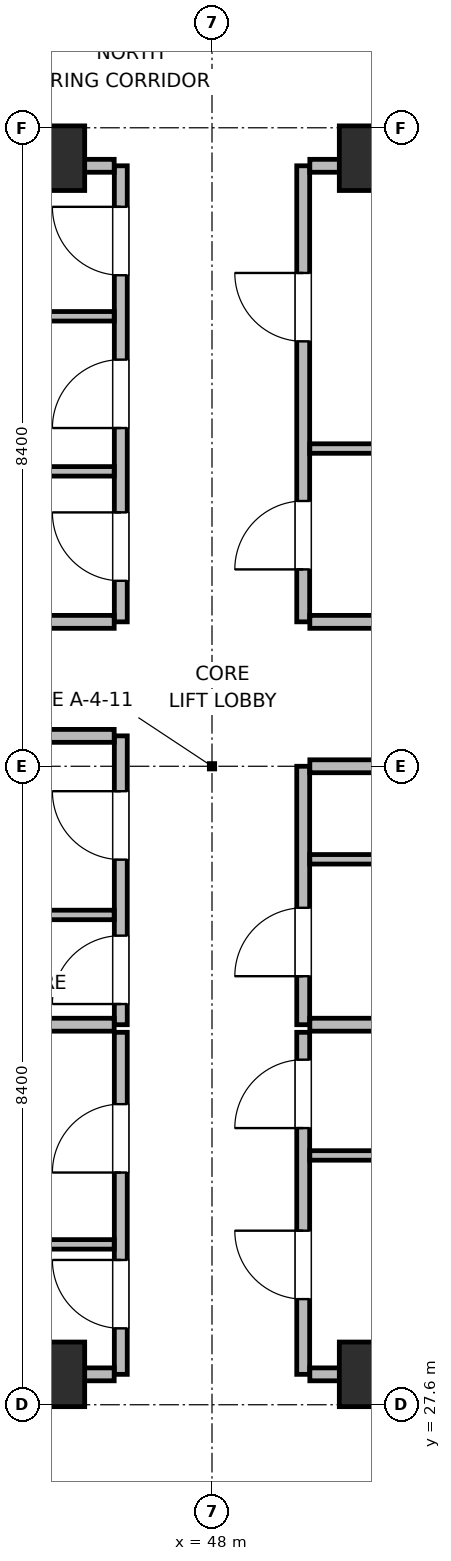
"""IFC4 building model, lengths in metres.
Left out: names, types, materials, properties, quantities, classifications, styles, units other than length and angle.
Written with IfcOpenShell. Run it as: python <this file> out.ifc"""

import sys

from ifc_helpers import new_model, si_unit, direction, frame, frame_2d, origin, origin_2d, place, context, subcontext, project, spatial, rectangle, extrude, element, fill, save


model = new_model("IFC4")
c1 = context("Model", 3, precision=1e-05, world=origin(), true_north=direction((0.0, 1.0)))
c2 = subcontext(c1, "Body", "Model", "MODEL_VIEW")
j1 = project(units=[si_unit("LENGTHUNIT", "METRE"), si_unit("PLANEANGLEUNIT", "RADIAN")], contexts=[c1])
p1 = place(None, origin())
s1 = spatial("IfcSite", under=j1, at=p1, CompositionType="ELEMENT")
p2 = place(p1, origin())
s2 = spatial("IfcBuilding", under=s1, at=p2, CompositionType="ELEMENT")
p3 = place(p2, frame((0.0, 0.0, 325.8)))
s3 = spatial("IfcBuildingStorey", under=s2, at=p3, CompositionType="ELEMENT", Elevation=325.8)
for number, where, z_axis, x_axis in (
    (1, (45.9, 28.0, 0.0), (0.0, 0.0, 1.0), (1.0, 0.0, 0.0)),
    (2, (50.1, 28.0, 0.0), (0.0, 0.0, 1.0), (1.0, 0.0, 0.0)),
    (3, (45.9, 44.0, 0.0), (0.0, 0.0, 1.0), (1.0, 0.0, 0.0)),
    (4, (50.1, 44.0, 0.0), (0.0, 0.0, 1.0), (1.0, 0.0, 0.0)),
):
    element("IfcColumn", number, at=place(p3, frame(where, z_axis=z_axis, x_axis=x_axis)), inside=s3, PredefinedType="COLUMN", context=c2, shape_type="SweptSolid", body=[
        extrude(rectangle(XDim=0.85, YDim=0.85, at=origin_2d()), origin(), (0.0, 0.0, 1.0), 3.9),
    ])
p4 = place(p3, frame((46.8, 32.6, 0.0), z_axis=(0.0, 0.0, 1.0), x_axis=(0.0, 1.0, 0.0)))
e5 = element("IfcWall", 5, at=p4, inside=s3, PredefinedType="PARTITIONING", context=c2, shape_type="SweptSolid", body=[
    extrude(rectangle(XDim=3.8, YDim=0.17, at=frame_2d((1.9, 0.0))), origin(), (0.0, 0.0, 1.0), 3.68),
])
p5 = place(p4, frame((0.272, 0.0, 0.0)))
e6 = element("IfcOpeningElement", 6, at=p5, cuts=e5, PredefinedType="OPENING", context=c2, shape_type="SweptSolid", body=[
    extrude(rectangle(XDim=0.9, YDim=2.02, at=frame_2d((0.45, 1.01))), frame((0.0, 0.095, 0.0), z_axis=(0.0, -1.0, 0.0), x_axis=(1.0, 0.0, 0.0)), (0.0, 0.0, 1.0), 0.19),
])
p6 = place(p4, frame((2.172, 0.0, 0.0)))
e7 = element("IfcOpeningElement", 7, at=p6, cuts=e5, PredefinedType="OPENING", context=c2, shape_type="SweptSolid", body=[
    extrude(rectangle(XDim=0.9, YDim=2.02, at=frame_2d((0.45, 1.01))), frame((0.0, 0.095, 0.0), z_axis=(0.0, -1.0, 0.0), x_axis=(1.0, 0.0, 0.0)), (0.0, 0.0, 1.0), 0.19),
])
for number, where, z_axis, x_axis in (
    (8, (43.8, 32.6, 0.0), (0.0, 0.0, 1.0), (1.0, 0.0, 0.0)),
    (9, (43.8, 36.4, 0.0), (0.0, 0.0, 1.0), (1.0, 0.0, 0.0)),
):
    element("IfcWall", number, at=place(p3, frame(where, z_axis=z_axis, x_axis=x_axis)), inside=s3, PredefinedType="PARTITIONING", context=c2, shape_type="SweptSolid", body=[
        extrude(rectangle(XDim=2.913, YDim=0.17, at=frame_2d((1.457, 0.0))), origin(), (0.0, 0.0, 1.0), 3.68),
    ])
p7 = place(p3, frame((43.8, 34.044, 0.0), z_axis=(0.0, 0.0, 1.0), x_axis=(1.0, 0.0, 0.0)))
e10 = element("IfcWall", 10, at=p7, inside=s3, PredefinedType="PARTITIONING", context=c2, shape_type="SweptSolid", body=[
    extrude(rectangle(XDim=2.913, YDim=0.125, at=frame_2d((1.457, 0.0))), origin(), (0.0, 0.0, 1.0), 3.68),
])
p8 = place(p3, frame((49.2, 32.6, 0.0), z_axis=(0.0, 0.0, 1.0), x_axis=(0.0, 1.0, 0.0)))
e11 = element("IfcWall", 11, at=p8, inside=s3, PredefinedType="PARTITIONING", context=c2, shape_type="SweptSolid", body=[
    extrude(rectangle(XDim=3.4, YDim=0.17, at=frame_2d((1.7, 0.0))), origin(), (0.0, 0.0, 1.0), 3.68),
])
p9 = place(p8, frame((0.638, 0.0, 0.0)))
e12 = element("IfcOpeningElement", 12, at=p9, cuts=e11, PredefinedType="OPENING", context=c2, shape_type="SweptSolid", body=[
    extrude(rectangle(XDim=0.9, YDim=2.02, at=frame_2d((0.45, 1.01))), frame((0.0, 0.095, 0.0), z_axis=(0.0, -1.0, 0.0), x_axis=(1.0, 0.0, 0.0)), (0.0, 0.0, 1.0), 0.19),
])
for number, where, z_axis, x_axis in (
    (13, (49.287, 32.6, 0.0), (0.0, 0.0, 1.0), (1.0, 0.0, 0.0)),
    (14, (49.287, 36.0, 0.0), (0.0, 0.0, 1.0), (1.0, 0.0, 0.0)),
):
    element("IfcWall", number, at=place(p3, frame(where, z_axis=z_axis, x_axis=x_axis)), inside=s3, PredefinedType="PARTITIONING", context=c2, shape_type="SweptSolid", body=[
        extrude(rectangle(XDim=2.913, YDim=0.17, at=frame_2d((1.457, 0.0))), origin(), (0.0, 0.0, 1.0), 3.68),
    ])
p10 = place(p3, frame((49.287, 34.776, 0.0), z_axis=(0.0, 0.0, 1.0), x_axis=(1.0, 0.0, 0.0)))
e15 = element("IfcWall", 15, at=p10, inside=s3, PredefinedType="PARTITIONING", context=c2, shape_type="SweptSolid", body=[
    extrude(rectangle(XDim=2.913, YDim=0.125, at=frame_2d((1.457, 0.0))), origin(), (0.0, 0.0, 1.0), 3.68),
])
p11 = place(p3, frame((46.8, 28.0, 0.0), z_axis=(0.0, 0.0, 1.0), x_axis=(0.0, 1.0, 0.0)))
e16 = element("IfcWall", 16, at=p11, inside=s3, PredefinedType="PARTITIONING", context=c2, shape_type="SweptSolid", body=[
    extrude(rectangle(XDim=4.5, YDim=0.17, at=frame_2d((2.25, 0.0))), origin(), (0.0, 0.0, 1.0), 3.68),
])
p12 = place(p11, frame((0.605, 0.0, 0.0)))
e17 = element("IfcOpeningElement", 17, at=p12, cuts=e16, PredefinedType="OPENING", context=c2, shape_type="SweptSolid", body=[
    extrude(rectangle(XDim=0.9, YDim=2.02, at=frame_2d((0.45, 1.01))), frame((0.0, 0.095, 0.0), z_axis=(0.0, -1.0, 0.0), x_axis=(1.0, 0.0, 0.0)), (0.0, 0.0, 1.0), 0.19),
])
p13 = place(p11, frame((2.655, 0.0, 0.0)))
e18 = element("IfcOpeningElement", 18, at=p13, cuts=e16, PredefinedType="OPENING", context=c2, shape_type="SweptSolid", body=[
    extrude(rectangle(XDim=0.9, YDim=2.02, at=frame_2d((0.45, 1.01))), frame((0.0, 0.095, 0.0), z_axis=(0.0, -1.0, 0.0), x_axis=(1.0, 0.0, 0.0)), (0.0, 0.0, 1.0), 0.19),
])
p14 = place(p3, frame((42.5, 28.0, 0.0), z_axis=(0.0, 0.0, 1.0), x_axis=(1.0, 0.0, 0.0)))
e19 = element("IfcWall", 19, at=p14, inside=s3, PredefinedType="PARTITIONING", context=c2, shape_type="SweptSolid", body=[
    extrude(rectangle(XDim=4.213, YDim=0.17, at=frame_2d((2.106, 0.0))), origin(), (0.0, 0.0, 1.0), 2.765),
])
p15 = place(p3, frame((42.5, 29.71, 0.0), z_axis=(0.0, 0.0, 1.0), x_axis=(1.0, 0.0, 0.0)))
e20 = element("IfcWall", 20, at=p15, inside=s3, PredefinedType="PARTITIONING", context=c2, shape_type="SweptSolid", body=[
    extrude(rectangle(XDim=4.213, YDim=0.125, at=frame_2d((2.106, 0.0))), origin(), (0.0, 0.0, 1.0), 3.68),
])
p16 = place(p3, frame((49.2, 28.0, 0.0), z_axis=(0.0, 0.0, 1.0), x_axis=(0.0, 1.0, 0.0)))
e21 = element("IfcWall", 21, at=p16, inside=s3, PredefinedType="PARTITIONING", context=c2, shape_type="SweptSolid", body=[
    extrude(rectangle(XDim=4.5, YDim=0.17, at=frame_2d((2.25, 0.0))), origin(), (0.0, 0.0, 1.0), 3.68),
])
p17 = place(p16, frame((0.99, 0.0, 0.0)))
e22 = element("IfcOpeningElement", 22, at=p17, cuts=e21, PredefinedType="OPENING", context=c2, shape_type="SweptSolid", body=[
    extrude(rectangle(XDim=0.9, YDim=2.02, at=frame_2d((0.45, 1.01))), frame((0.0, 0.095, 0.0), z_axis=(0.0, -1.0, 0.0), x_axis=(1.0, 0.0, 0.0)), (0.0, 0.0, 1.0), 0.19),
])
p18 = place(p16, frame((3.24, 0.0, 0.0)))
e23 = element("IfcOpeningElement", 23, at=p18, cuts=e21, PredefinedType="OPENING", context=c2, shape_type="SweptSolid", body=[
    extrude(rectangle(XDim=0.9, YDim=2.02, at=frame_2d((0.45, 1.01))), frame((0.0, 0.095, 0.0), z_axis=(0.0, -1.0, 0.0), x_axis=(1.0, 0.0, 0.0)), (0.0, 0.0, 1.0), 0.19),
])
p19 = place(p3, frame((49.287, 28.0, 0.0), z_axis=(0.0, 0.0, 1.0), x_axis=(1.0, 0.0, 0.0)))
e24 = element("IfcWall", 24, at=p19, inside=s3, PredefinedType="PARTITIONING", context=c2, shape_type="SweptSolid", body=[
    extrude(rectangle(XDim=4.213, YDim=0.17, at=frame_2d((2.106, 0.0))), origin(), (0.0, 0.0, 1.0), 2.765),
])
p20 = place(p3, frame((49.287, 30.88, 0.0), z_axis=(0.0, 0.0, 1.0), x_axis=(1.0, 0.0, 0.0)))
e25 = element("IfcWall", 25, at=p20, inside=s3, PredefinedType="PARTITIONING", context=c2, shape_type="SweptSolid", body=[
    extrude(rectangle(XDim=4.213, YDim=0.125, at=frame_2d((2.106, 0.0))), origin(), (0.0, 0.0, 1.0), 3.68),
])
p21 = place(p3, frame((46.8, 37.9, 0.0), z_axis=(0.0, 0.0, 1.0), x_axis=(0.0, 1.0, 0.0)))
e26 = element("IfcWall", 26, at=p21, inside=s3, PredefinedType="PARTITIONING", context=c2, shape_type="SweptSolid", body=[
    extrude(rectangle(XDim=6.0, YDim=0.17, at=frame_2d((3.0, 0.0))), origin(), (0.0, 0.0, 1.0), 3.68),
])
p22 = place(p21, frame((0.54, 0.0, 0.0)))
e27 = element("IfcOpeningElement", 27, at=p22, cuts=e26, PredefinedType="OPENING", context=c2, shape_type="SweptSolid", body=[
    extrude(rectangle(XDim=0.9, YDim=2.02, at=frame_2d((0.45, 1.01))), frame((0.0, 0.095, 0.0), z_axis=(0.0, -1.0, 0.0), x_axis=(1.0, 0.0, 0.0)), (0.0, 0.0, 1.0), 0.19),
])
p23 = place(p21, frame((2.55, 0.0, 0.0)))
e28 = element("IfcOpeningElement", 28, at=p23, cuts=e26, PredefinedType="OPENING", context=c2, shape_type="SweptSolid", body=[
    extrude(rectangle(XDim=0.9, YDim=2.02, at=frame_2d((0.45, 1.01))), frame((0.0, 0.095, 0.0), z_axis=(0.0, -1.0, 0.0), x_axis=(1.0, 0.0, 0.0)), (0.0, 0.0, 1.0), 0.19),
])
p24 = place(p21, frame((4.56, 0.0, 0.0)))
e29 = element("IfcOpeningElement", 29, at=p24, cuts=e26, PredefinedType="OPENING", context=c2, shape_type="SweptSolid", body=[
    extrude(rectangle(XDim=0.9, YDim=2.02, at=frame_2d((0.45, 1.01))), frame((0.0, 0.095, 0.0), z_axis=(0.0, -1.0, 0.0), x_axis=(1.0, 0.0, 0.0)), (0.0, 0.0, 1.0), 0.19),
])
p25 = place(p3, frame((42.5, 37.9, 0.0), z_axis=(0.0, 0.0, 1.0), x_axis=(1.0, 0.0, 0.0)))
e30 = element("IfcWall", 30, at=p25, inside=s3, PredefinedType="PARTITIONING", context=c2, shape_type="SweptSolid", body=[
    extrude(rectangle(XDim=4.213, YDim=0.17, at=frame_2d((2.106, 0.0))), origin(), (0.0, 0.0, 1.0), 3.68),
])
p26 = place(p3, frame((42.5, 43.9, 0.0), z_axis=(0.0, 0.0, 1.0), x_axis=(1.0, 0.0, 0.0)))
e31 = element("IfcWall", 31, at=p26, inside=s3, PredefinedType="PARTITIONING", context=c2, shape_type="SweptSolid", body=[
    extrude(rectangle(XDim=4.213, YDim=0.17, at=frame_2d((2.106, 0.0))), origin(), (0.0, 0.0, 1.0), 2.765),
])
for number, where, z_axis, x_axis in (
    (32, (42.5, 39.88, 0.0), (0.0, 0.0, 1.0), (1.0, 0.0, 0.0)),
    (33, (42.5, 41.92, 0.0), (0.0, 0.0, 1.0), (1.0, 0.0, 0.0)),
):
    element("IfcWall", number, at=place(p3, frame(where, z_axis=z_axis, x_axis=x_axis)), inside=s3, PredefinedType="PARTITIONING", context=c2, shape_type="SweptSolid", body=[
        extrude(rectangle(XDim=4.213, YDim=0.125, at=frame_2d((2.106, 0.0))), origin(), (0.0, 0.0, 1.0), 3.68),
    ])
p27 = place(p3, frame((49.2, 37.9, 0.0), z_axis=(0.0, 0.0, 1.0), x_axis=(0.0, 1.0, 0.0)))
e34 = element("IfcWall", 34, at=p27, inside=s3, PredefinedType="PARTITIONING", context=c2, shape_type="SweptSolid", body=[
    extrude(rectangle(XDim=6.0, YDim=0.17, at=frame_2d((3.0, 0.0))), origin(), (0.0, 0.0, 1.0), 3.68),
])
p28 = place(p27, frame((0.69, 0.0, 0.0)))
e35 = element("IfcOpeningElement", 35, at=p28, cuts=e34, PredefinedType="OPENING", context=c2, shape_type="SweptSolid", body=[
    extrude(rectangle(XDim=0.9, YDim=2.02, at=frame_2d((0.45, 1.01))), frame((0.0, 0.095, 0.0), z_axis=(0.0, -1.0, 0.0), x_axis=(1.0, 0.0, 0.0)), (0.0, 0.0, 1.0), 0.19),
])
p29 = place(p27, frame((3.69, 0.0, 0.0)))
e36 = element("IfcOpeningElement", 36, at=p29, cuts=e34, PredefinedType="OPENING", context=c2, shape_type="SweptSolid", body=[
    extrude(rectangle(XDim=0.9, YDim=2.02, at=frame_2d((0.45, 1.01))), frame((0.0, 0.095, 0.0), z_axis=(0.0, -1.0, 0.0), x_axis=(1.0, 0.0, 0.0)), (0.0, 0.0, 1.0), 0.19),
])
p30 = place(p3, frame((49.287, 37.9, 0.0), z_axis=(0.0, 0.0, 1.0), x_axis=(1.0, 0.0, 0.0)))
e37 = element("IfcWall", 37, at=p30, inside=s3, PredefinedType="PARTITIONING", context=c2, shape_type="SweptSolid", body=[
    extrude(rectangle(XDim=4.113, YDim=0.17, at=frame_2d((2.056, 0.0))), origin(), (0.0, 0.0, 1.0), 3.68),
])
p31 = place(p3, frame((49.287, 43.9, 0.0), z_axis=(0.0, 0.0, 1.0), x_axis=(1.0, 0.0, 0.0)))
e38 = element("IfcWall", 38, at=p31, inside=s3, PredefinedType="PARTITIONING", context=c2, shape_type="SweptSolid", body=[
    extrude(rectangle(XDim=4.113, YDim=0.17, at=frame_2d((2.056, 0.0))), origin(), (0.0, 0.0, 1.0), 2.765),
])
p32 = place(p3, frame((49.287, 40.18, 0.0), z_axis=(0.0, 0.0, 1.0), x_axis=(1.0, 0.0, 0.0)))
e39 = element("IfcWall", 39, at=p32, inside=s3, PredefinedType="PARTITIONING", context=c2, shape_type="SweptSolid", body=[
    extrude(rectangle(XDim=4.113, YDim=0.125, at=frame_2d((2.056, 0.0))), origin(), (0.0, 0.0, 1.0), 3.68),
])
p33 = place(p5, origin())
e40 = element("IfcDoor", 40, at=p33, inside=s3, OperationType="SINGLE_SWING_LEFT", PredefinedType="DOOR", context=c2, shape_type="SweptSolid", body=[
    extrude(rectangle(XDim=0.9, YDim=2.02, at=frame_2d((0.45, 1.01))), frame((0.0, 0.025, 0.0), z_axis=(0.0, -1.0, 0.0), x_axis=(1.0, 0.0, 0.0)), (0.0, 0.0, 1.0), 0.05),
])
fill(e6, e40)
p34 = place(p6, origin())
e41 = element("IfcDoor", 41, at=p34, inside=s3, OperationType="SINGLE_SWING_RIGHT", PredefinedType="DOOR", context=c2, shape_type="SweptSolid", body=[
    extrude(rectangle(XDim=0.9, YDim=2.02, at=frame_2d((0.45, 1.01))), frame((0.0, 0.025, 0.0), z_axis=(0.0, -1.0, 0.0), x_axis=(1.0, 0.0, 0.0)), (0.0, 0.0, 1.0), 0.05),
])
fill(e7, e41)
p35 = place(p9, origin())
e42 = element("IfcDoor", 42, at=p35, inside=s3, OperationType="SINGLE_SWING_LEFT", PredefinedType="DOOR", context=c2, shape_type="SweptSolid", body=[
    extrude(rectangle(XDim=0.9, YDim=2.02, at=frame_2d((0.45, 1.01))), frame((0.0, 0.025, 0.0), z_axis=(0.0, -1.0, 0.0), x_axis=(1.0, 0.0, 0.0)), (0.0, 0.0, 1.0), 0.05),
])
fill(e12, e42)
p36 = place(p12, origin())
e43 = element("IfcDoor", 43, at=p36, inside=s3, OperationType="SINGLE_SWING_RIGHT", PredefinedType="DOOR", context=c2, shape_type="SweptSolid", body=[
    extrude(rectangle(XDim=0.9, YDim=2.02, at=frame_2d((0.45, 1.01))), frame((0.0, 0.025, 0.0), z_axis=(0.0, -1.0, 0.0), x_axis=(1.0, 0.0, 0.0)), (0.0, 0.0, 1.0), 0.05),
])
fill(e17, e43)
p37 = place(p13, origin())
e44 = element("IfcDoor", 44, at=p37, inside=s3, OperationType="SINGLE_SWING_LEFT", PredefinedType="DOOR", context=c2, shape_type="SweptSolid", body=[
    extrude(rectangle(XDim=0.9, YDim=2.02, at=frame_2d((0.45, 1.01))), frame((0.0, 0.025, 0.0), z_axis=(0.0, -1.0, 0.0), x_axis=(1.0, 0.0, 0.0)), (0.0, 0.0, 1.0), 0.05),
])
fill(e18, e44)
p38 = place(p17, origin())
e45 = element("IfcDoor", 45, at=p38, inside=s3, OperationType="SINGLE_SWING_RIGHT", PredefinedType="DOOR", context=c2, shape_type="SweptSolid", body=[
    extrude(rectangle(XDim=0.9, YDim=2.02, at=frame_2d((0.45, 1.01))), frame((0.0, 0.025, 0.0), z_axis=(0.0, -1.0, 0.0), x_axis=(1.0, 0.0, 0.0)), (0.0, 0.0, 1.0), 0.05),
])
fill(e22, e45)
p39 = place(p18, origin())
e46 = element("IfcDoor", 46, at=p39, inside=s3, OperationType="SINGLE_SWING_LEFT", PredefinedType="DOOR", context=c2, shape_type="SweptSolid", body=[
    extrude(rectangle(XDim=0.9, YDim=2.02, at=frame_2d((0.45, 1.01))), frame((0.0, 0.025, 0.0), z_axis=(0.0, -1.0, 0.0), x_axis=(1.0, 0.0, 0.0)), (0.0, 0.0, 1.0), 0.05),
])
fill(e23, e46)
p40 = place(p22, origin())
e47 = element("IfcDoor", 47, at=p40, inside=s3, OperationType="SINGLE_SWING_RIGHT", PredefinedType="DOOR", context=c2, shape_type="SweptSolid", body=[
    extrude(rectangle(XDim=0.9, YDim=2.02, at=frame_2d((0.45, 1.01))), frame((0.0, 0.025, 0.0), z_axis=(0.0, -1.0, 0.0), x_axis=(1.0, 0.0, 0.0)), (0.0, 0.0, 1.0), 0.05),
])
fill(e27, e47)
p41 = place(p23, origin())
e48 = element("IfcDoor", 48, at=p41, inside=s3, OperationType="SINGLE_SWING_LEFT", PredefinedType="DOOR", context=c2, shape_type="SweptSolid", body=[
    extrude(rectangle(XDim=0.9, YDim=2.02, at=frame_2d((0.45, 1.01))), frame((0.0, 0.025, 0.0), z_axis=(0.0, -1.0, 0.0), x_axis=(1.0, 0.0, 0.0)), (0.0, 0.0, 1.0), 0.05),
])
fill(e28, e48)
p42 = place(p24, origin())
e49 = element("IfcDoor", 49, at=p42, inside=s3, OperationType="SINGLE_SWING_RIGHT", PredefinedType="DOOR", context=c2, shape_type="SweptSolid", body=[
    extrude(rectangle(XDim=0.9, YDim=2.02, at=frame_2d((0.45, 1.01))), frame((0.0, 0.025, 0.0), z_axis=(0.0, -1.0, 0.0), x_axis=(1.0, 0.0, 0.0)), (0.0, 0.0, 1.0), 0.05),
])
fill(e29, e49)
p43 = place(p28, origin())
e50 = element("IfcDoor", 50, at=p43, inside=s3, OperationType="SINGLE_SWING_LEFT", PredefinedType="DOOR", context=c2, shape_type="SweptSolid", body=[
    extrude(rectangle(XDim=0.9, YDim=2.02, at=frame_2d((0.45, 1.01))), frame((0.0, 0.025, 0.0), z_axis=(0.0, -1.0, 0.0), x_axis=(1.0, 0.0, 0.0)), (0.0, 0.0, 1.0), 0.05),
])
fill(e35, e50)
p44 = place(p29, origin())
e51 = element("IfcDoor", 51, at=p44, inside=s3, OperationType="SINGLE_SWING_RIGHT", PredefinedType="DOOR", context=c2, shape_type="SweptSolid", body=[
    extrude(rectangle(XDim=0.9, YDim=2.02, at=frame_2d((0.45, 1.01))), frame((0.0, 0.025, 0.0), z_axis=(0.0, -1.0, 0.0), x_axis=(1.0, 0.0, 0.0)), (0.0, 0.0, 1.0), 0.05),
])
fill(e36, e51)
save(model, sys.argv[1])
